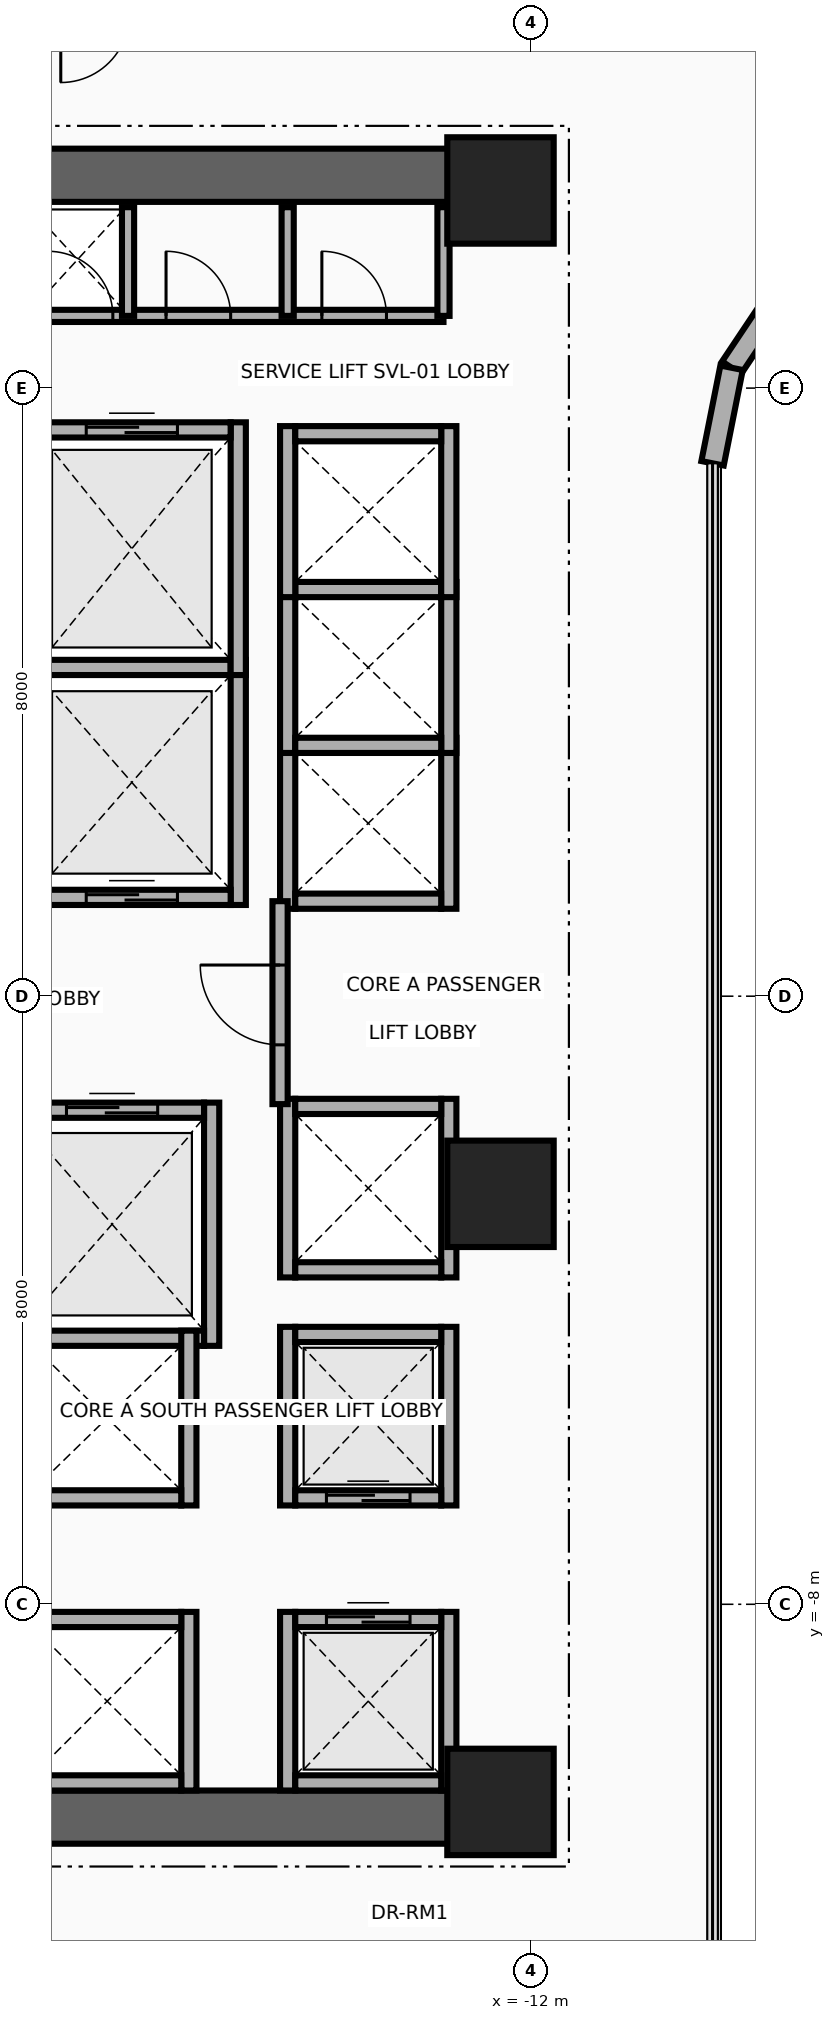
"""IFC4 building model, lengths in metres.
Left out: names, types, materials, properties, quantities, classifications, styles, units other than length and angle.
Written with IfcOpenShell. Run it as: python <this file> out.ifc"""

import sys

from ifc_helpers import new_model, si_unit, direction, frame, frame_2d, origin, origin_2d, place, context, subcontext, project, spatial, rectangle, extrude, source, transform, mapped, element, fill, save


model = new_model("IFC4")
c1 = context("Model", 3, precision=1e-05, world=origin(), true_north=direction((0.0, 1.0)))
c2 = subcontext(c1, "Body", "Model", "MODEL_VIEW")
j1 = project(units=[si_unit("LENGTHUNIT", "METRE"), si_unit("PLANEANGLEUNIT", "RADIAN")], contexts=[c1])
p1 = place(None, origin())
s1 = spatial("IfcSite", under=j1, at=p1, CompositionType="ELEMENT")
p2 = place(p1, origin())
s2 = spatial("IfcBuilding", under=s1, at=p2, CompositionType="ELEMENT")
p3 = place(p2, frame((0.0, 0.0, 85.2)))
s3 = spatial("IfcBuildingStorey", under=s2, at=p3, CompositionType="ELEMENT", Elevation=85.2)
for number, where, z_axis, x_axis in (
    (1, (-22.65, 10.8, 0.0), (0.0, 0.0, 1.0), (1.0, 0.0, 0.0)),
    (2, (-22.65, -10.8, 0.0), (0.0, 0.0, 1.0), (1.0, 0.0, 0.0)),
):
    element("IfcWall", number, at=place(p3, frame(where, z_axis=z_axis, x_axis=x_axis)), inside=s3, PredefinedType="SHEAR", context=c2, shape_type="SweptSolid", body=[
        extrude(rectangle(XDim=10.25, YDim=0.7, at=frame_2d((5.125, 0.0))), origin(), (0.0, 0.0, 1.0), 3.46),
    ])
m1 = source(origin(), c2, "Body", "SweptSolid", [
    extrude(rectangle(XDim=1.4, YDim=1.4, at=origin_2d()), origin(), (0.0, 0.0, 1.0), 3.7),
])
for number, where, z_axis, x_axis in (
    (3, (-12.4, -10.6, 0.0), (0.0, 0.0, 1.0), (1.0, 0.0, 0.0)),
    (4, (-12.4, -2.6, 0.0), (0.0, 0.0, 1.0), (1.0, 0.0, 0.0)),
    (5, (-12.4, 10.6, 0.0), (0.0, 0.0, 1.0), (1.0, 0.0, 0.0)),
):
    element("IfcColumn", number, at=place(p3, frame(where, z_axis=z_axis, x_axis=x_axis)), inside=s3, PredefinedType="COLUMN", context=c2, shape_type="MappedRepresentation", body=[
        mapped(m1, transform((0.0, 0.0, 0.0), x_axis=(1.0, 0.0, 0.0), y_axis=(0.0, 1.0, 0.0), z_axis=(0.0, 0.0, 1.0), scale=1.0)),
    ])
p4 = place(p3, frame((-8.642, 9.342, 0.0), z_axis=(0.0, 0.0, 1.0), x_axis=(-0.555615398575, -0.831439431869, 0.0)))
e6 = element("IfcWall", 6, at=p4, inside=s3, PredefinedType="SOLIDWALL", context=c2, shape_type="SweptSolid", body=[
    extrude(rectangle(XDim=1.292, YDim=0.3, at=frame_2d((0.646, 0.0))), origin(), (0.0, 0.0, 1.0), 3.46),
])
p5 = place(p3, frame((-9.36, 8.268, 0.0), z_axis=(0.0, 0.0, 1.0), x_axis=(-0.195090163074, -0.980785312019, 0.0)))
e7 = element("IfcWall", 7, at=p5, inside=s3, PredefinedType="SOLIDWALL", context=c2, shape_type="SweptSolid", body=[
    extrude(rectangle(XDim=1.281, YDim=0.3, at=frame_2d((0.641, 0.0))), origin(), (0.0, 0.0, 1.0), 3.46),
])
p6 = place(p3, frame((-15.85, 1.2, 0.0), z_axis=(0.0, 0.0, 1.0), x_axis=(0.0, 1.0, 0.0)))
e8 = element("IfcWall", 8, at=p6, inside=s3, PredefinedType="MOVABLE", context=c2, shape_type="SweptSolid", body=[
    extrude(rectangle(XDim=3.225, YDim=0.2, at=frame_2d((1.613, 0.0))), origin(), (0.0, 0.0, 1.0), 3.46),
])
p7 = place(p3, frame((-18.55, 1.3, 0.0), z_axis=(0.0, 0.0, 1.0), x_axis=(1.0, 0.0, 0.0)))
e9 = element("IfcWall", 9, at=p7, inside=s3, PredefinedType="MOVABLE", context=c2, shape_type="SweptSolid", body=[
    extrude(rectangle(XDim=2.6, YDim=0.2, at=frame_2d((1.3, 0.0))), origin(), (0.0, 0.0, 1.0), 3.46),
])
p8 = place(p7, frame((0.7, 0.0, 0.0)))
e10 = element("IfcOpeningElement", 10, at=p8, cuts=e9, PredefinedType="OPENING", context=c2, shape_type="SweptSolid", body=[
    extrude(rectangle(XDim=1.2, YDim=2.1, at=frame_2d((0.6, 1.05))), frame((0.0, 0.115, 0.0), z_axis=(0.0, -1.0, 0.0), x_axis=(1.0, 0.0, 0.0)), (0.0, 0.0, 1.0), 0.23),
])
p9 = place(p3, frame((-18.55, 4.325, 0.0), z_axis=(0.0, 0.0, 1.0), x_axis=(1.0, 0.0, 0.0)))
e11 = element("IfcWall", 11, at=p9, inside=s3, PredefinedType="MOVABLE", context=c2, shape_type="SweptSolid", body=[
    extrude(rectangle(XDim=2.6, YDim=0.2, at=frame_2d((1.3, 0.0))), origin(), (0.0, 0.0, 1.0), 3.46),
])
p10 = place(p3, frame((-16.2, -4.6, 0.0), z_axis=(0.0, 0.0, 1.0), x_axis=(0.0, 1.0, 0.0)))
e12 = element("IfcWall", 12, at=p10, inside=s3, PredefinedType="MOVABLE", context=c2, shape_type="SweptSolid", body=[
    extrude(rectangle(XDim=3.2, YDim=0.2, at=frame_2d((1.6, 0.0))), origin(), (0.0, 0.0, 1.0), 3.46),
])
p11 = place(p3, frame((-18.72, -4.5, 0.0), z_axis=(0.0, 0.0, 1.0), x_axis=(1.0, 0.0, 0.0)))
e13 = element("IfcWall", 13, at=p11, inside=s3, PredefinedType="MOVABLE", context=c2, shape_type="SweptSolid", body=[
    extrude(rectangle(XDim=2.42, YDim=0.2, at=frame_2d((1.21, 0.0))), origin(), (0.0, 0.0, 1.0), 3.46),
])
p12 = place(p3, frame((-18.72, -1.5, 0.0), z_axis=(0.0, 0.0, 1.0), x_axis=(1.0, 0.0, 0.0)))
e14 = element("IfcWall", 14, at=p12, inside=s3, PredefinedType="MOVABLE", context=c2, shape_type="SweptSolid", body=[
    extrude(rectangle(XDim=2.42, YDim=0.2, at=frame_2d((1.21, 0.0))), origin(), (0.0, 0.0, 1.0), 3.46),
])
p13 = place(p12, frame((0.61, 0.0, 0.0)))
e15 = element("IfcOpeningElement", 15, at=p13, cuts=e14, PredefinedType="OPENING", context=c2, shape_type="SweptSolid", body=[
    extrude(rectangle(XDim=1.2, YDim=2.1, at=frame_2d((0.6, 1.05))), frame((0.0, 0.115, 0.0), z_axis=(0.0, -1.0, 0.0), x_axis=(1.0, 0.0, 0.0)), (0.0, 0.0, 1.0), 0.23),
])
p14 = place(p3, frame((-15.85, 4.225, 0.0), z_axis=(0.0, 0.0, 1.0), x_axis=(0.0, 1.0, 0.0)))
e16 = element("IfcWall", 16, at=p14, inside=s3, PredefinedType="MOVABLE", context=c2, shape_type="SweptSolid", body=[
    extrude(rectangle(XDim=3.325, YDim=0.2, at=frame_2d((1.663, 0.0))), origin(), (0.0, 0.0, 1.0), 3.46),
])
p15 = place(p3, frame((-18.55, 7.45, 0.0), z_axis=(0.0, 0.0, 1.0), x_axis=(1.0, 0.0, 0.0)))
e17 = element("IfcWall", 17, at=p15, inside=s3, PredefinedType="MOVABLE", context=c2, shape_type="SweptSolid", body=[
    extrude(rectangle(XDim=2.6, YDim=0.2, at=frame_2d((1.3, 0.0))), origin(), (0.0, 0.0, 1.0), 3.46),
])
p16 = place(p15, frame((0.7, 0.0, 0.0)))
e18 = element("IfcOpeningElement", 18, at=p16, cuts=e17, PredefinedType="OPENING", context=c2, shape_type="SweptSolid", body=[
    extrude(rectangle(XDim=1.2, YDim=2.1, at=frame_2d((0.6, 1.05))), frame((0.0, 0.115, 0.0), z_axis=(0.0, -1.0, 0.0), x_axis=(1.0, 0.0, 0.0)), (0.0, 0.0, 1.0), 0.23),
])
for number, where, z_axis, x_axis in (
    (19, (-15.2, -10.45, 0.0), (0.0, 0.0, 1.0), (0.0, 1.0, 0.0)),
    (20, (-13.08, -10.45, 0.0), (0.0, 0.0, 1.0), (0.0, 1.0, 0.0)),
):
    element("IfcWall", number, at=place(p3, frame(where, z_axis=z_axis, x_axis=x_axis)), inside=s3, PredefinedType="MOVABLE", context=c2, shape_type="SweptSolid", body=[
        extrude(rectangle(XDim=2.35, YDim=0.2, at=frame_2d((1.175, 0.0))), origin(), (0.0, 0.0, 1.0), 2.583),
    ])
p17 = place(p3, frame((-15.1, -10.35, 0.0), z_axis=(0.0, 0.0, 1.0), x_axis=(1.0, 0.0, 0.0)))
e21 = element("IfcWall", 21, at=p17, inside=s3, PredefinedType="MOVABLE", context=c2, shape_type="SweptSolid", body=[
    extrude(rectangle(XDim=1.92, YDim=0.2, at=frame_2d((0.96, 0.0))), origin(), (0.0, 0.0, 1.0), 2.583),
])
p18 = place(p3, frame((-15.1, -8.2, 0.0), z_axis=(0.0, 0.0, 1.0), x_axis=(1.0, 0.0, 0.0)))
e22 = element("IfcWall", 22, at=p18, inside=s3, PredefinedType="MOVABLE", context=c2, shape_type="SweptSolid", body=[
    extrude(rectangle(XDim=1.92, YDim=0.2, at=frame_2d((0.96, 0.0))), origin(), (0.0, 0.0, 1.0), 3.46),
])
p19 = place(p18, frame((0.41, 0.0, 0.0)))
e23 = element("IfcOpeningElement", 23, at=p19, cuts=e22, PredefinedType="OPENING", context=c2, shape_type="SweptSolid", body=[
    extrude(rectangle(XDim=1.1, YDim=2.1, at=frame_2d((0.55, 1.05))), frame((0.0, 0.115, 0.0), z_axis=(0.0, -1.0, 0.0), x_axis=(1.0, 0.0, 0.0)), (0.0, 0.0, 1.0), 0.23),
])
for number, where, z_axis, x_axis in (
    (24, (-15.2, -6.7, 0.0), (0.0, 0.0, 1.0), (0.0, 1.0, 0.0)),
    (25, (-13.08, -6.7, 0.0), (0.0, 0.0, 1.0), (0.0, 1.0, 0.0)),
):
    element("IfcWall", number, at=place(p3, frame(where, z_axis=z_axis, x_axis=x_axis)), inside=s3, PredefinedType="MOVABLE", context=c2, shape_type="SweptSolid", body=[
        extrude(rectangle(XDim=2.35, YDim=0.2, at=frame_2d((1.175, 0.0))), origin(), (0.0, 0.0, 1.0), 3.46),
    ])
p20 = place(p3, frame((-15.1, -6.6, 0.0), z_axis=(0.0, 0.0, 1.0), x_axis=(1.0, 0.0, 0.0)))
e26 = element("IfcWall", 26, at=p20, inside=s3, PredefinedType="MOVABLE", context=c2, shape_type="SweptSolid", body=[
    extrude(rectangle(XDim=1.92, YDim=0.2, at=frame_2d((0.96, 0.0))), origin(), (0.0, 0.0, 1.0), 3.46),
])
p21 = place(p20, frame((0.41, 0.0, 0.0)))
e27 = element("IfcOpeningElement", 27, at=p21, cuts=e26, PredefinedType="OPENING", context=c2, shape_type="SweptSolid", body=[
    extrude(rectangle(XDim=1.1, YDim=2.1, at=frame_2d((0.55, 1.05))), frame((0.0, 0.115, 0.0), z_axis=(0.0, -1.0, 0.0), x_axis=(1.0, 0.0, 0.0)), (0.0, 0.0, 1.0), 0.23),
])
p22 = place(p3, frame((-15.1, -4.45, 0.0), z_axis=(0.0, 0.0, 1.0), x_axis=(1.0, 0.0, 0.0)))
e28 = element("IfcWall", 28, at=p22, inside=s3, PredefinedType="MOVABLE", context=c2, shape_type="SweptSolid", body=[
    extrude(rectangle(XDim=1.92, YDim=0.2, at=frame_2d((0.96, 0.0))), origin(), (0.0, 0.0, 1.0), 3.46),
])
p23 = place(p3, frame((-16.5, -10.45, 0.0), z_axis=(0.0, 0.0, 1.0), x_axis=(0.0, 1.0, 0.0)))
e29 = element("IfcWall", 29, at=p23, inside=s3, PredefinedType="MOVABLE", context=c2, shape_type="SweptSolid", body=[
    extrude(rectangle(XDim=2.35, YDim=0.2, at=frame_2d((1.175, 0.0))), origin(), (0.0, 0.0, 1.0), 2.583),
])
p24 = place(p3, frame((-18.55, -10.35, 0.0), z_axis=(0.0, 0.0, 1.0), x_axis=(1.0, 0.0, 0.0)))
e30 = element("IfcWall", 30, at=p24, inside=s3, PredefinedType="MOVABLE", context=c2, shape_type="SweptSolid", body=[
    extrude(rectangle(XDim=1.95, YDim=0.2, at=frame_2d((0.975, 0.0))), origin(), (0.0, 0.0, 1.0), 2.583),
])
p25 = place(p3, frame((-18.55, -8.2, 0.0), z_axis=(0.0, 0.0, 1.0), x_axis=(1.0, 0.0, 0.0)))
e31 = element("IfcWall", 31, at=p25, inside=s3, PredefinedType="MOVABLE", context=c2, shape_type="SweptSolid", body=[
    extrude(rectangle(XDim=1.95, YDim=0.2, at=frame_2d((0.975, 0.0))), origin(), (0.0, 0.0, 1.0), 3.46),
])
for number, where, z_axis, x_axis in (
    (32, (-15.2, 1.15, 0.0), (0.0, 0.0, 1.0), (0.0, 1.0, 0.0)),
    (33, (-13.08, 1.15, 0.0), (0.0, 0.0, 1.0), (0.0, 1.0, 0.0)),
):
    element("IfcWall", number, at=place(p3, frame(where, z_axis=z_axis, x_axis=x_axis)), inside=s3, PredefinedType="MOVABLE", context=c2, shape_type="SweptSolid", body=[
        extrude(rectangle(XDim=2.25, YDim=0.2, at=frame_2d((1.125, 0.0))), origin(), (0.0, 0.0, 1.0), 3.46),
    ])
p26 = place(p3, frame((-15.1, 1.25, 0.0), z_axis=(0.0, 0.0, 1.0), x_axis=(1.0, 0.0, 0.0)))
e34 = element("IfcWall", 34, at=p26, inside=s3, PredefinedType="MOVABLE", context=c2, shape_type="SweptSolid", body=[
    extrude(rectangle(XDim=1.92, YDim=0.2, at=frame_2d((0.96, 0.0))), origin(), (0.0, 0.0, 1.0), 3.46),
])
for number, where, z_axis, x_axis in (
    (35, (-15.2, 3.2, 0.0), (0.0, 0.0, 1.0), (0.0, 1.0, 0.0)),
    (36, (-13.08, 3.2, 0.0), (0.0, 0.0, 1.0), (0.0, 1.0, 0.0)),
):
    element("IfcWall", number, at=place(p3, frame(where, z_axis=z_axis, x_axis=x_axis)), inside=s3, PredefinedType="MOVABLE", context=c2, shape_type="SweptSolid", body=[
        extrude(rectangle(XDim=2.25, YDim=0.2, at=frame_2d((1.125, 0.0))), origin(), (0.0, 0.0, 1.0), 3.46),
    ])
for number, where, z_axis, x_axis in (
    (37, (-15.1, 3.3, 0.0), (0.0, 0.0, 1.0), (1.0, 0.0, 0.0)),
    (38, (-15.1, 5.35, 0.0), (0.0, 0.0, 1.0), (1.0, 0.0, 0.0)),
):
    element("IfcWall", number, at=place(p3, frame(where, z_axis=z_axis, x_axis=x_axis)), inside=s3, PredefinedType="MOVABLE", context=c2, shape_type="SweptSolid", body=[
        extrude(rectangle(XDim=1.92, YDim=0.2, at=frame_2d((0.96, 0.0))), origin(), (0.0, 0.0, 1.0), 3.46),
    ])
for number, where, z_axis, x_axis in (
    (39, (-15.2, 5.25, 0.0), (0.0, 0.0, 1.0), (0.0, 1.0, 0.0)),
    (40, (-13.08, 5.25, 0.0), (0.0, 0.0, 1.0), (0.0, 1.0, 0.0)),
):
    element("IfcWall", number, at=place(p3, frame(where, z_axis=z_axis, x_axis=x_axis)), inside=s3, PredefinedType="MOVABLE", context=c2, shape_type="SweptSolid", body=[
        extrude(rectangle(XDim=2.25, YDim=0.2, at=frame_2d((1.125, 0.0))), origin(), (0.0, 0.0, 1.0), 3.46),
    ])
p27 = place(p3, frame((-15.1, 7.4, 0.0), z_axis=(0.0, 0.0, 1.0), x_axis=(1.0, 0.0, 0.0)))
e41 = element("IfcWall", 41, at=p27, inside=s3, PredefinedType="MOVABLE", context=c2, shape_type="SweptSolid", body=[
    extrude(rectangle(XDim=1.92, YDim=0.2, at=frame_2d((0.96, 0.0))), origin(), (0.0, 0.0, 1.0), 3.46),
])
p28 = place(p3, frame((-16.5, -6.7, 0.0), z_axis=(0.0, 0.0, 1.0), x_axis=(0.0, 1.0, 0.0)))
e42 = element("IfcWall", 42, at=p28, inside=s3, PredefinedType="MOVABLE", context=c2, shape_type="SweptSolid", body=[
    extrude(rectangle(XDim=2.3, YDim=0.2, at=frame_2d((1.15, 0.0))), origin(), (0.0, 0.0, 1.0), 3.46),
])
p29 = place(p3, frame((-18.55, -6.6, 0.0), z_axis=(0.0, 0.0, 1.0), x_axis=(1.0, 0.0, 0.0)))
e43 = element("IfcWall", 43, at=p29, inside=s3, PredefinedType="MOVABLE", context=c2, shape_type="SweptSolid", body=[
    extrude(rectangle(XDim=1.95, YDim=0.2, at=frame_2d((0.975, 0.0))), origin(), (0.0, 0.0, 1.0), 3.46),
])
for number, where, z_axis, x_axis in (
    (44, (-15.2, -3.7, 0.0), (0.0, 0.0, 1.0), (0.0, 1.0, 0.0)),
    (45, (-13.08, -3.7, 0.0), (0.0, 0.0, 1.0), (0.0, 1.0, 0.0)),
):
    element("IfcWall", number, at=place(p3, frame(where, z_axis=z_axis, x_axis=x_axis)), inside=s3, PredefinedType="MOVABLE", context=c2, shape_type="SweptSolid", body=[
        extrude(rectangle(XDim=2.35, YDim=0.2, at=frame_2d((1.175, 0.0))), origin(), (0.0, 0.0, 1.0), 3.46),
    ])
for number, where, z_axis, x_axis in (
    (46, (-15.1, -3.6, 0.0), (0.0, 0.0, 1.0), (1.0, 0.0, 0.0)),
    (47, (-15.1, -1.45, 0.0), (0.0, 0.0, 1.0), (1.0, 0.0, 0.0)),
):
    element("IfcWall", number, at=place(p3, frame(where, z_axis=z_axis, x_axis=x_axis)), inside=s3, PredefinedType="MOVABLE", context=c2, shape_type="SweptSolid", body=[
        extrude(rectangle(XDim=1.92, YDim=0.2, at=frame_2d((0.96, 0.0))), origin(), (0.0, 0.0, 1.0), 3.46),
    ])
p30 = place(p3, frame((-15.3, -1.42, 0.0), z_axis=(0.0, 0.0, 1.0), x_axis=(0.0, 1.0, 0.0)))
e48 = element("IfcWall", 48, at=p30, inside=s3, PredefinedType="PARTITIONING", context=c2, shape_type="SweptSolid", body=[
    extrude(rectangle(XDim=2.67, YDim=0.2, at=frame_2d((1.335, 0.0))), origin(), (0.0, 0.0, 1.0), 3.46),
])
p31 = place(p30, frame((0.78, 0.0, 0.0)))
e49 = element("IfcOpeningElement", 49, at=p31, cuts=e48, PredefinedType="OPENING", context=c2, shape_type="SweptSolid", body=[
    extrude(rectangle(XDim=1.05, YDim=2.15, at=frame_2d((0.525, 1.075))), frame((0.0, 0.115, 0.0), z_axis=(0.0, -1.0, 0.0), x_axis=(1.0, 0.0, 0.0)), (0.0, 0.0, 1.0), 0.23),
])
p32 = place(p3, frame((-18.65, 8.95, 0.0), z_axis=(0.0, 0.0, 1.0), x_axis=(1.0, 0.0, 0.0)))
e50 = element("IfcWall", 50, at=p32, inside=s3, PredefinedType="PARTITIONING", context=c2, shape_type="SweptSolid", body=[
    extrude(rectangle(XDim=5.5, YDim=0.16, at=frame_2d((2.75, 0.0))), origin(), (0.0, 0.0, 1.0), 3.46),
])
p33 = place(p32, frame((0.3, 0.0, 0.0)))
e51 = element("IfcOpeningElement", 51, at=p33, cuts=e50, PredefinedType="OPENING", context=c2, shape_type="SweptSolid", body=[
    extrude(rectangle(XDim=0.85, YDim=2.05, at=frame_2d((0.425, 1.025))), frame((0.0, 0.095, 0.0), z_axis=(0.0, -1.0, 0.0), x_axis=(1.0, 0.0, 0.0)), (0.0, 0.0, 1.0), 0.19),
])
p34 = place(p32, frame((1.85, 0.0, 0.0)))
e52 = element("IfcOpeningElement", 52, at=p34, cuts=e50, PredefinedType="OPENING", context=c2, shape_type="SweptSolid", body=[
    extrude(rectangle(XDim=0.85, YDim=2.05, at=frame_2d((0.425, 1.025))), frame((0.0, 0.095, 0.0), z_axis=(0.0, -1.0, 0.0), x_axis=(1.0, 0.0, 0.0)), (0.0, 0.0, 1.0), 0.19),
])
p35 = place(p32, frame((3.9, 0.0, 0.0)))
e53 = element("IfcOpeningElement", 53, at=p35, cuts=e50, PredefinedType="OPENING", context=c2, shape_type="SweptSolid", body=[
    extrude(rectangle(XDim=0.85, YDim=2.05, at=frame_2d((0.425, 1.025))), frame((0.0, 0.095, 0.0), z_axis=(0.0, -1.0, 0.0), x_axis=(1.0, 0.0, 0.0)), (0.0, 0.0, 1.0), 0.19),
])
for number, where, z_axis, x_axis in (
    (54, (-13.15, 8.95, 0.0), (0.0, 0.0, 1.0), (0.0, 1.0, 0.0)),
    (55, (-17.3, 8.95, 0.0), (0.0, 0.0, 1.0), (0.0, 1.0, 0.0)),
    (56, (-15.2, 8.95, 0.0), (0.0, 0.0, 1.0), (0.0, 1.0, 0.0)),
):
    element("IfcWall", number, at=place(p3, frame(where, z_axis=z_axis, x_axis=x_axis)), inside=s3, PredefinedType="PARTITIONING", context=c2, shape_type="SweptSolid", body=[
        extrude(rectangle(XDim=1.43, YDim=0.16, at=frame_2d((0.715, 0.0))), origin(), (0.0, 0.0, 1.0), 3.46),
    ])
p36 = place(p8, origin())
e57 = element("IfcDoor", 57, at=p36, inside=s3, OperationType="DOUBLE_DOOR_SLIDING", PredefinedType="DOOR", context=c2, shape_type="SweptSolid", body=[
    extrude(rectangle(XDim=1.2, YDim=2.1, at=frame_2d((0.6, 1.05))), frame((0.0, 0.025, 0.0), z_axis=(0.0, -1.0, 0.0), x_axis=(1.0, 0.0, 0.0)), (0.0, 0.0, 1.0), 0.05),
])
fill(e10, e57)
p37 = place(p13, origin())
e58 = element("IfcDoor", 58, at=p37, inside=s3, OperationType="DOUBLE_DOOR_SLIDING", PredefinedType="DOOR", context=c2, shape_type="SweptSolid", body=[
    extrude(rectangle(XDim=1.2, YDim=2.1, at=frame_2d((0.6, 1.05))), frame((0.0, 0.025, 0.0), z_axis=(0.0, -1.0, 0.0), x_axis=(1.0, 0.0, 0.0)), (0.0, 0.0, 1.0), 0.05),
])
fill(e15, e58)
p38 = place(p16, origin())
e59 = element("IfcDoor", 59, at=p38, inside=s3, OperationType="DOUBLE_DOOR_SLIDING", PredefinedType="DOOR", context=c2, shape_type="SweptSolid", body=[
    extrude(rectangle(XDim=1.2, YDim=2.1, at=frame_2d((0.6, 1.05))), frame((0.0, 0.025, 0.0), z_axis=(0.0, -1.0, 0.0), x_axis=(1.0, 0.0, 0.0)), (0.0, 0.0, 1.0), 0.05),
])
fill(e18, e59)
p39 = place(p19, origin())
e60 = element("IfcDoor", 60, at=p39, inside=s3, OperationType="DOUBLE_DOOR_SLIDING", PredefinedType="DOOR", context=c2, shape_type="SweptSolid", body=[
    extrude(rectangle(XDim=1.1, YDim=2.1, at=frame_2d((0.55, 1.05))), frame((0.0, 0.025, 0.0), z_axis=(0.0, -1.0, 0.0), x_axis=(1.0, 0.0, 0.0)), (0.0, 0.0, 1.0), 0.05),
])
fill(e23, e60)
p40 = place(p21, origin())
e61 = element("IfcDoor", 61, at=p40, inside=s3, OperationType="DOUBLE_DOOR_SLIDING", PredefinedType="DOOR", context=c2, shape_type="SweptSolid", body=[
    extrude(rectangle(XDim=1.1, YDim=2.1, at=frame_2d((0.55, 1.05))), frame((0.0, 0.025, 0.0), z_axis=(0.0, -1.0, 0.0), x_axis=(1.0, 0.0, 0.0)), (0.0, 0.0, 1.0), 0.05),
])
fill(e27, e61)
p41 = place(p31, origin())
e62 = element("IfcDoor", 62, at=p41, inside=s3, OperationType="SINGLE_SWING_RIGHT", PredefinedType="DOOR", context=c2, shape_type="SweptSolid", body=[
    extrude(rectangle(XDim=1.05, YDim=2.15, at=frame_2d((0.525, 1.075))), frame((0.0, 0.025, 0.0), z_axis=(0.0, -1.0, 0.0), x_axis=(1.0, 0.0, 0.0)), (0.0, 0.0, 1.0), 0.05),
])
fill(e49, e62)
p42 = place(p33, origin())
e63 = element("IfcDoor", 63, at=p42, inside=s3, OperationType="SINGLE_SWING_LEFT", PredefinedType="DOOR", context=c2, shape_type="SweptSolid", body=[
    extrude(rectangle(XDim=0.85, YDim=2.05, at=frame_2d((0.425, 1.025))), frame((0.0, 0.025, 0.0), z_axis=(0.0, -1.0, 0.0), x_axis=(1.0, 0.0, 0.0)), (0.0, 0.0, 1.0), 0.05),
])
fill(e51, e63)
p43 = place(p34, origin())
e64 = element("IfcDoor", 64, at=p43, inside=s3, OperationType="SINGLE_SWING_RIGHT", PredefinedType="DOOR", context=c2, shape_type="SweptSolid", body=[
    extrude(rectangle(XDim=0.85, YDim=2.05, at=frame_2d((0.425, 1.025))), frame((0.0, 0.025, 0.0), z_axis=(0.0, -1.0, 0.0), x_axis=(1.0, 0.0, 0.0)), (0.0, 0.0, 1.0), 0.05),
])
fill(e52, e64)
p44 = place(p35, origin())
e65 = element("IfcDoor", 65, at=p44, inside=s3, OperationType="SINGLE_SWING_LEFT", PredefinedType="DOOR", context=c2, shape_type="SweptSolid", body=[
    extrude(rectangle(XDim=0.85, YDim=2.05, at=frame_2d((0.425, 1.025))), frame((0.0, 0.025, 0.0), z_axis=(0.0, -1.0, 0.0), x_axis=(1.0, 0.0, 0.0)), (0.0, 0.0, 1.0), 0.05),
])
fill(e53, e65)
save(model, sys.argv[1])
